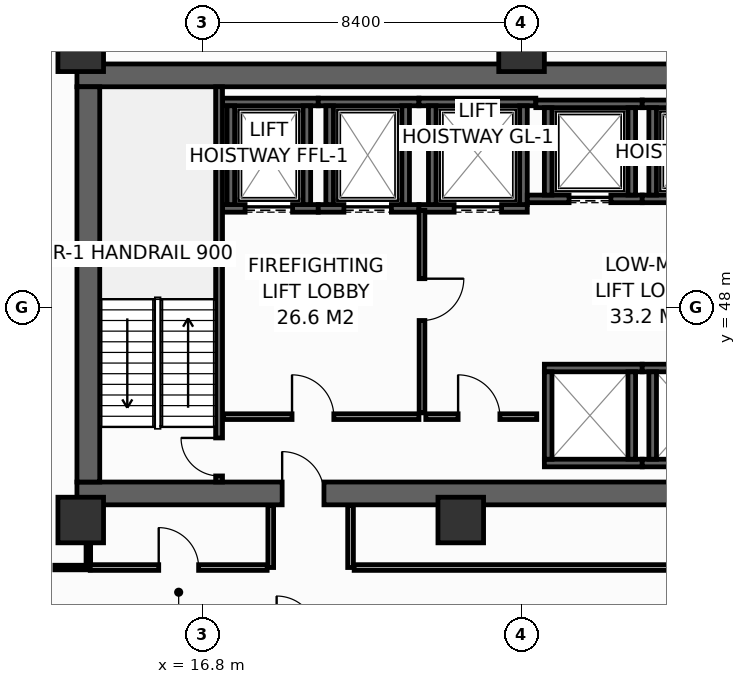
"""IFC4 building model, lengths in metres.
Left out: names, types, materials, properties, quantities, classifications, styles, units other than length and angle.
Written with IfcOpenShell. Run it as: python <this file> out.ifc"""

import sys

from ifc_helpers import new_model, si_unit, direction, frame, frame_2d, origin, origin_2d, place, context, subcontext, project, spatial, rectangle, hollow_rectangle, extrude, element, fill, save


model = new_model("IFC4")
c1 = context("Model", 3, precision=1e-05, world=origin(), true_north=direction((0.0, 1.0)))
c2 = subcontext(c1, "Body", "Model", "MODEL_VIEW")
j1 = project(units=[si_unit("LENGTHUNIT", "METRE"), si_unit("PLANEANGLEUNIT", "RADIAN")], contexts=[c1])
p1 = place(None, origin())
s1 = spatial("IfcSite", under=j1, at=p1, CompositionType="ELEMENT")
p2 = place(p1, origin())
s2 = spatial("IfcBuilding", under=s1, at=p2, CompositionType="ELEMENT")
p3 = place(p2, frame((0.0, 0.0, 56.0)))
s3 = spatial("IfcBuildingStorey", under=s2, at=p3, CompositionType="ELEMENT", Elevation=56.0)
p4 = place(p3, frame((13.5, 43.1, 0.0), z_axis=(0.0, 0.0, 1.0), x_axis=(1.0, 0.0, 0.0)))
e1 = element("IfcWall", 1, at=p4, inside=s3, PredefinedType="SHEAR", context=c2, shape_type="SweptSolid", body=[
    extrude(rectangle(XDim=32.9, YDim=0.6, at=frame_2d((16.45, 0.0))), origin(), (0.0, 0.0, 1.0), 4.15),
])
p5 = place(p4, frame((5.4, 0.0, 0.0)))
e2 = element("IfcOpeningElement", 2, at=p5, cuts=e1, PredefinedType="OPENING", context=c2, shape_type="SweptSolid", body=[
    extrude(rectangle(XDim=1.1, YDim=2.15, at=frame_2d((0.55, 1.075))), frame((0.0, 0.31, 0.0), z_axis=(0.0, -1.0, 0.0), x_axis=(1.0, 0.0, 0.0)), (0.0, 0.0, 1.0), 0.62),
])
p6 = place(p4, frame((25.6, 0.0, 0.0)))
e3 = element("IfcOpeningElement", 3, at=p6, cuts=e1, PredefinedType="OPENING", context=c2, shape_type="SweptSolid", body=[
    extrude(rectangle(XDim=1.1, YDim=2.15, at=frame_2d((0.55, 1.075))), frame((0.0, 0.31, 0.0), z_axis=(0.0, -1.0, 0.0), x_axis=(1.0, 0.0, 0.0)), (0.0, 0.0, 1.0), 0.62),
])
p7 = place(p3, frame((13.5, 54.1, 0.0), z_axis=(0.0, 0.0, 1.0), x_axis=(1.0, 0.0, 0.0)))
e4 = element("IfcWall", 4, at=p7, inside=s3, PredefinedType="SHEAR", context=c2, shape_type="SweptSolid", body=[
    extrude(rectangle(XDim=32.9, YDim=0.6, at=frame_2d((16.45, 0.0))), origin(), (0.0, 0.0, 1.0), 4.15),
])
p8 = place(p3, frame((13.8, 43.4, 0.0), z_axis=(0.0, 0.0, 1.0), x_axis=(0.0, 1.0, 0.0)))
e5 = element("IfcWall", 5, at=p8, inside=s3, PredefinedType="SHEAR", context=c2, shape_type="SweptSolid", body=[
    extrude(rectangle(XDim=10.4, YDim=0.6, at=frame_2d((5.2, 0.0))), origin(), (0.0, 0.0, 1.0), 4.15),
])
for number, where, z_axis, x_axis in (
    (6, (13.6, 54.8, 0.0), (0.0, 0.0, 1.0), (1.0, 0.0, 0.0)),
    (7, (25.2, 54.8, 0.0), (0.0, 0.0, 1.0), (1.0, 0.0, 0.0)),
    (8, (13.6, 42.4, 0.0), (0.0, 0.0, 1.0), (1.0, 0.0, 0.0)),
    (9, (23.6, 42.4, 0.0), (0.0, 0.0, 1.0), (1.0, 0.0, 0.0)),
):
    element("IfcColumn", number, at=place(p3, frame(where, z_axis=z_axis, x_axis=x_axis)), inside=s3, PredefinedType="COLUMN", context=c2, shape_type="SweptSolid", body=[
        extrude(hollow_rectangle(XDim=1.2, YDim=1.2, WallThickness=0.055, at=origin_2d()), origin(), (0.0, 0.0, 1.0), 4.4),
    ])
p9 = place(p3, frame((17.33, 50.6, 0.0), z_axis=(0.0, 0.0, 1.0), x_axis=(1.0, 0.0, 0.0)))
e10 = element("IfcWall", 10, at=p9, inside=s3, PredefinedType="SHEAR", context=c2, shape_type="SweptSolid", body=[
    extrude(rectangle(XDim=2.52, YDim=0.2, at=frame_2d((1.26, 0.0))), origin(), (0.0, 0.0, 1.0), 4.15),
])
p10 = place(p9, frame((0.595, 0.0, 0.0)))
e11 = element("IfcOpeningElement", 11, at=p10, cuts=e10, PredefinedType="OPENING", context=c2, shape_type="SweptSolid", body=[
    extrude(rectangle(XDim=1.25, YDim=2.3, at=frame_2d((0.625, 1.15))), frame((0.0, 0.11, 0.0), z_axis=(0.0, -1.0, 0.0), x_axis=(1.0, 0.0, 0.0)), (0.0, 0.0, 1.0), 0.22),
])
p11 = place(p3, frame((17.33, 53.4, 0.0), z_axis=(0.0, 0.0, 1.0), x_axis=(1.0, 0.0, 0.0)))
e12 = element("IfcWall", 12, at=p11, inside=s3, PredefinedType="SHEAR", context=c2, shape_type="SweptSolid", body=[
    extrude(rectangle(XDim=2.52, YDim=0.2, at=frame_2d((1.26, 0.0))), origin(), (0.0, 0.0, 1.0), 4.15),
])
for number, where, z_axis, x_axis in (
    (13, (17.55, 50.7, 0.0), (0.0, 0.0, 1.0), (0.0, 1.0, 0.0)),
    (14, (19.55, 50.7, 0.0), (0.0, 0.0, 1.0), (0.0, 1.0, 0.0)),
):
    element("IfcWall", number, at=place(p3, frame(where, z_axis=z_axis, x_axis=x_axis)), inside=s3, PredefinedType="SHEAR", context=c2, shape_type="SweptSolid", body=[
        extrude(rectangle(XDim=2.6, YDim=0.2, at=frame_2d((1.3, 0.0))), origin(), (0.0, 0.0, 1.0), 4.15),
    ])
p12 = place(p3, frame((19.85, 50.6, 0.0), z_axis=(0.0, 0.0, 1.0), x_axis=(1.0, 0.0, 0.0)))
e15 = element("IfcWall", 15, at=p12, inside=s3, PredefinedType="SHEAR", context=c2, shape_type="SweptSolid", body=[
    extrude(rectangle(XDim=2.65, YDim=0.2, at=frame_2d((1.325, 0.0))), origin(), (0.0, 0.0, 1.0), 4.15),
])
p13 = place(p12, frame((0.675, 0.0, 0.0)))
e16 = element("IfcOpeningElement", 16, at=p13, cuts=e15, PredefinedType="OPENING", context=c2, shape_type="SweptSolid", body=[
    extrude(rectangle(XDim=1.25, YDim=2.3, at=frame_2d((0.625, 1.15))), frame((0.0, 0.11, 0.0), z_axis=(0.0, -1.0, 0.0), x_axis=(1.0, 0.0, 0.0)), (0.0, 0.0, 1.0), 0.22),
])
p14 = place(p3, frame((19.85, 53.4, 0.0), z_axis=(0.0, 0.0, 1.0), x_axis=(1.0, 0.0, 0.0)))
e17 = element("IfcWall", 17, at=p14, inside=s3, PredefinedType="SHEAR", context=c2, shape_type="SweptSolid", body=[
    extrude(rectangle(XDim=2.65, YDim=0.2, at=frame_2d((1.325, 0.0))), origin(), (0.0, 0.0, 1.0), 4.15),
])
for number, where, z_axis, x_axis in (
    (18, (20.15, 50.7, 0.0), (0.0, 0.0, 1.0), (0.0, 1.0, 0.0)),
    (19, (22.15, 50.7, 0.0), (0.0, 0.0, 1.0), (0.0, 1.0, 0.0)),
):
    element("IfcWall", number, at=place(p3, frame(where, z_axis=z_axis, x_axis=x_axis)), inside=s3, PredefinedType="SHEAR", context=c2, shape_type="SweptSolid", body=[
        extrude(rectangle(XDim=2.6, YDim=0.2, at=frame_2d((1.3, 0.0))), origin(), (0.0, 0.0, 1.0), 4.15),
    ])
p15 = place(p3, frame((22.5, 50.6, 0.0), z_axis=(0.0, 0.0, 1.0), x_axis=(1.0, 0.0, 0.0)))
e20 = element("IfcWall", 20, at=p15, inside=s3, PredefinedType="SHEAR", context=c2, shape_type="SweptSolid", body=[
    extrude(rectangle(XDim=2.85, YDim=0.2, at=frame_2d((1.425, 0.0))), origin(), (0.0, 0.0, 1.0), 4.15),
])
p16 = place(p15, frame((0.925, 0.0, 0.0)))
e21 = element("IfcOpeningElement", 21, at=p16, cuts=e20, PredefinedType="OPENING", context=c2, shape_type="SweptSolid", body=[
    extrude(rectangle(XDim=1.25, YDim=2.3, at=frame_2d((0.625, 1.15))), frame((0.0, 0.11, 0.0), z_axis=(0.0, -1.0, 0.0), x_axis=(1.0, 0.0, 0.0)), (0.0, 0.0, 1.0), 0.22),
])
p17 = place(p3, frame((22.5, 53.4, 0.0), z_axis=(0.0, 0.0, 1.0), x_axis=(1.0, 0.0, 0.0)))
e22 = element("IfcWall", 22, at=p17, inside=s3, PredefinedType="SHEAR", context=c2, shape_type="SweptSolid", body=[
    extrude(rectangle(XDim=3.075, YDim=0.2, at=frame_2d((1.538, 0.0))), origin(), (0.0, 0.0, 1.0), 4.15),
])
for number, where, z_axis, x_axis in (
    (23, (22.85, 50.7, 0.0), (0.0, 0.0, 1.0), (0.0, 1.0, 0.0)),
    (24, (25.25, 50.7, 0.0), (0.0, 0.0, 1.0), (0.0, 1.0, 0.0)),
):
    element("IfcWall", number, at=place(p3, frame(where, z_axis=z_axis, x_axis=x_axis)), inside=s3, PredefinedType="SHEAR", context=c2, shape_type="SweptSolid", body=[
        extrude(rectangle(XDim=2.6, YDim=0.2, at=frame_2d((1.3, 0.0))), origin(), (0.0, 0.0, 1.0), 4.15),
    ])
p18 = place(p3, frame((25.35, 50.85, 0.0), z_axis=(0.0, 0.0, 1.0), x_axis=(1.0, 0.0, 0.0)))
e25 = element("IfcWall", 25, at=p18, inside=s3, PredefinedType="SHEAR", context=c2, shape_type="SweptSolid", body=[
    extrude(rectangle(XDim=3.025, YDim=0.2, at=frame_2d((1.512, 0.0))), origin(), (0.0, 0.0, 1.0), 4.15),
])
p19 = place(p18, frame((1.1, 0.0, 0.0)))
e26 = element("IfcOpeningElement", 26, at=p19, cuts=e25, PredefinedType="OPENING", context=c2, shape_type="SweptSolid", body=[
    extrude(rectangle(XDim=1.1, YDim=2.2, at=frame_2d((0.55, 1.1))), frame((0.0, 0.11, 0.0), z_axis=(0.0, -1.0, 0.0), x_axis=(1.0, 0.0, 0.0)), (0.0, 0.0, 1.0), 0.22),
])
p20 = place(p3, frame((25.575, 53.35, 0.0), z_axis=(0.0, 0.0, 1.0), x_axis=(1.0, 0.0, 0.0)))
e27 = element("IfcWall", 27, at=p20, inside=s3, PredefinedType="SHEAR", context=c2, shape_type="SweptSolid", body=[
    extrude(rectangle(XDim=2.8, YDim=0.2, at=frame_2d((1.4, 0.0))), origin(), (0.0, 0.0, 1.0), 4.15),
])
for number, where, z_axis, x_axis in (
    (28, (25.9, 50.95, 0.0), (0.0, 0.0, 1.0), (0.0, 1.0, 0.0)),
    (29, (28.1, 50.95, 0.0), (0.0, 0.0, 1.0), (0.0, 1.0, 0.0)),
):
    element("IfcWall", number, at=place(p3, frame(where, z_axis=z_axis, x_axis=x_axis)), inside=s3, PredefinedType="SHEAR", context=c2, shape_type="SweptSolid", body=[
        extrude(rectangle(XDim=2.3, YDim=0.2, at=frame_2d((1.15, 0.0))), origin(), (0.0, 0.0, 1.0), 4.15),
    ])
p21 = place(p3, frame((28.375, 50.85, 0.0), z_axis=(0.0, 0.0, 1.0), x_axis=(1.0, 0.0, 0.0)))
e30 = element("IfcWall", 30, at=p21, inside=s3, PredefinedType="SHEAR", context=c2, shape_type="SweptSolid", body=[
    extrude(rectangle(XDim=2.75, YDim=0.2, at=frame_2d((1.375, 0.0))), origin(), (0.0, 0.0, 1.0), 4.15),
])
p22 = place(p21, frame((0.825, 0.0, 0.0)))
e31 = element("IfcOpeningElement", 31, at=p22, cuts=e30, PredefinedType="OPENING", context=c2, shape_type="SweptSolid", body=[
    extrude(rectangle(XDim=1.1, YDim=2.2, at=frame_2d((0.55, 1.1))), frame((0.0, 0.11, 0.0), z_axis=(0.0, -1.0, 0.0), x_axis=(1.0, 0.0, 0.0)), (0.0, 0.0, 1.0), 0.22),
])
p23 = place(p3, frame((28.375, 53.35, 0.0), z_axis=(0.0, 0.0, 1.0), x_axis=(1.0, 0.0, 0.0)))
e32 = element("IfcWall", 32, at=p23, inside=s3, PredefinedType="SHEAR", context=c2, shape_type="SweptSolid", body=[
    extrude(rectangle(XDim=2.75, YDim=0.2, at=frame_2d((1.375, 0.0))), origin(), (0.0, 0.0, 1.0), 4.15),
])
p24 = place(p3, frame((28.65, 50.95, 0.0), z_axis=(0.0, 0.0, 1.0), x_axis=(0.0, 1.0, 0.0)))
e33 = element("IfcWall", 33, at=p24, inside=s3, PredefinedType="SHEAR", context=c2, shape_type="SweptSolid", body=[
    extrude(rectangle(XDim=2.3, YDim=0.2, at=frame_2d((1.15, 0.0))), origin(), (0.0, 0.0, 1.0), 4.15),
])
for number, where, z_axis, x_axis in (
    (34, (25.8, 43.9, 0.0), (0.0, 0.0, 1.0), (1.0, 0.0, 0.0)),
    (35, (25.8, 46.4, 0.0), (0.0, 0.0, 1.0), (1.0, 0.0, 0.0)),
):
    element("IfcWall", number, at=place(p3, frame(where, z_axis=z_axis, x_axis=x_axis)), inside=s3, PredefinedType="SHEAR", context=c2, shape_type="SweptSolid", body=[
        extrude(rectangle(XDim=2.575, YDim=0.2, at=frame_2d((1.288, 0.0))), origin(), (0.0, 0.0, 1.0), 4.15),
    ])
for number, where, z_axis, x_axis in (
    (36, (25.9, 44.0, 0.0), (0.0, 0.0, 1.0), (0.0, 1.0, 0.0)),
    (37, (28.1, 44.0, 0.0), (0.0, 0.0, 1.0), (0.0, 1.0, 0.0)),
):
    element("IfcWall", number, at=place(p3, frame(where, z_axis=z_axis, x_axis=x_axis)), inside=s3, PredefinedType="SHEAR", context=c2, shape_type="SweptSolid", body=[
        extrude(rectangle(XDim=2.3, YDim=0.2, at=frame_2d((1.15, 0.0))), origin(), (0.0, 0.0, 1.0), 4.15),
    ])
for number, where, z_axis, x_axis in (
    (38, (28.375, 43.9, 0.0), (0.0, 0.0, 1.0), (1.0, 0.0, 0.0)),
    (39, (28.375, 46.4, 0.0), (0.0, 0.0, 1.0), (1.0, 0.0, 0.0)),
):
    element("IfcWall", number, at=place(p3, frame(where, z_axis=z_axis, x_axis=x_axis)), inside=s3, PredefinedType="SHEAR", context=c2, shape_type="SweptSolid", body=[
        extrude(rectangle(XDim=2.75, YDim=0.2, at=frame_2d((1.375, 0.0))), origin(), (0.0, 0.0, 1.0), 4.15),
    ])
p25 = place(p3, frame((28.65, 44.0, 0.0), z_axis=(0.0, 0.0, 1.0), x_axis=(0.0, 1.0, 0.0)))
e40 = element("IfcWall", 40, at=p25, inside=s3, PredefinedType="SHEAR", context=c2, shape_type="SweptSolid", body=[
    extrude(rectangle(XDim=2.3, YDim=0.2, at=frame_2d((1.15, 0.0))), origin(), (0.0, 0.0, 1.0), 4.15),
])
p26 = place(p3, frame((17.24, 43.4, 0.0), z_axis=(0.0, 0.0, 1.0), x_axis=(0.0, 1.0, 0.0)))
e41 = element("IfcWall", 41, at=p26, inside=s3, PredefinedType="SHEAR", context=c2, shape_type="SweptSolid", body=[
    extrude(rectangle(XDim=10.4, YDim=0.18, at=frame_2d((5.2, 0.0))), origin(), (0.0, 0.0, 1.0), 4.15),
])
p27 = place(p26, frame((0.16, 0.0, 0.0)))
e42 = element("IfcOpeningElement", 42, at=p27, cuts=e41, PredefinedType="OPENING", context=c2, shape_type="SweptSolid", body=[
    extrude(rectangle(XDim=1.0, YDim=2.15, at=frame_2d((0.5, 1.075))), frame((0.0, 0.1, 0.0), z_axis=(0.0, -1.0, 0.0), x_axis=(1.0, 0.0, 0.0)), (0.0, 0.0, 1.0), 0.2),
])
p28 = place(p3, frame((17.36, 45.12, 0.0), z_axis=(0.0, 0.0, 1.0), x_axis=(1.0, 0.0, 0.0)))
e43 = element("IfcWall", 43, at=p28, inside=s3, PredefinedType="PARTITIONING", context=c2, shape_type="SweptSolid", body=[
    extrude(rectangle(XDim=5.14, YDim=0.15, at=frame_2d((2.57, 0.0))), origin(), (0.0, 0.0, 1.0), 4.15),
])
p29 = place(p28, frame((1.8, 0.0, 0.0)))
e44 = element("IfcOpeningElement", 44, at=p29, cuts=e43, PredefinedType="OPENING", context=c2, shape_type="SweptSolid", body=[
    extrude(rectangle(XDim=1.1, YDim=2.15, at=frame_2d((0.55, 1.075))), frame((0.0, 0.085, 0.0), z_axis=(0.0, -1.0, 0.0), x_axis=(1.0, 0.0, 0.0)), (0.0, 0.0, 1.0), 0.17),
])
p30 = place(p3, frame((22.58, 50.55, 0.0), z_axis=(0.0, 0.0, 1.0), x_axis=(0.0, -1.0, 0.0)))
e45 = element("IfcWall", 45, at=p30, inside=s3, PredefinedType="PARTITIONING", context=c2, shape_type="SweptSolid", body=[
    extrude(rectangle(XDim=5.33, YDim=0.15, at=frame_2d((2.665, 0.0))), origin(), (0.0, 0.0, 1.0), 4.15),
])
p31 = place(p30, frame((1.8, 0.0, 0.0)))
e46 = element("IfcOpeningElement", 46, at=p31, cuts=e45, PredefinedType="OPENING", context=c2, shape_type="SweptSolid", body=[
    extrude(rectangle(XDim=1.1, YDim=2.15, at=frame_2d((0.55, 1.075))), frame((0.0, 0.085, 0.0), z_axis=(0.0, -1.0, 0.0), x_axis=(1.0, 0.0, 0.0)), (0.0, 0.0, 1.0), 0.17),
])
p32 = place(p3, frame((22.68, 45.12, 0.0), z_axis=(0.0, 0.0, 1.0), x_axis=(1.0, 0.0, 0.0)))
e47 = element("IfcWall", 47, at=p32, inside=s3, PredefinedType="PARTITIONING", context=c2, shape_type="SweptSolid", body=[
    extrude(rectangle(XDim=2.92, YDim=0.15, at=frame_2d((1.46, 0.0))), origin(), (0.0, 0.0, 1.0), 4.15),
])
p33 = place(p32, frame((0.85, 0.0, 0.0)))
e48 = element("IfcOpeningElement", 48, at=p33, cuts=e47, PredefinedType="OPENING", context=c2, shape_type="SweptSolid", body=[
    extrude(rectangle(XDim=1.1, YDim=2.15, at=frame_2d((0.55, 1.075))), frame((0.0, 0.085, 0.0), z_axis=(0.0, -1.0, 0.0), x_axis=(1.0, 0.0, 0.0)), (0.0, 0.0, 1.0), 0.17),
])
p34 = place(p3, frame((12.92, 41.15, 0.0), z_axis=(0.0, 0.0, 1.0), x_axis=(1.0, 0.0, 0.0)))
e49 = element("IfcWall", 49, at=p34, inside=s3, PredefinedType="PARTITIONING", context=c2, shape_type="SweptSolid", body=[
    extrude(rectangle(XDim=0.93, YDim=0.12, at=frame_2d((0.465, 0.0))), origin(), (0.0, 0.0, 1.0), 4.15),
])
p35 = place(p3, frame((13.8, 41.23, 0.0), z_axis=(0.0, 0.0, 1.0), x_axis=(0.0, 1.0, 0.0)))
e50 = element("IfcWall", 50, at=p35, inside=s3, PredefinedType="PARTITIONING", context=c2, shape_type="SweptSolid", body=[
    extrude(rectangle(XDim=1.55, YDim=0.12, at=frame_2d((0.775, 0.0))), origin(), (0.0, 0.0, 1.0), 4.15),
])
for number, where, z_axis, x_axis in (
    (51, (18.6, 41.15, 0.0), (0.0, 0.0, 1.0), (0.0, 1.0, 0.0)),
    (52, (20.7, 41.15, 0.0), (0.0, 0.0, 1.0), (0.0, 1.0, 0.0)),
):
    element("IfcWall", number, at=place(p3, frame(where, z_axis=z_axis, x_axis=x_axis)), inside=s3, PredefinedType="PARTITIONING", context=c2, shape_type="SweptSolid", body=[
        extrude(rectangle(XDim=1.63, YDim=0.15, at=frame_2d((0.815, 0.0))), origin(), (0.0, 0.0, 1.0), 4.15),
    ])
p36 = place(p3, frame((13.85, 41.15, 0.0), z_axis=(0.0, 0.0, 1.0), x_axis=(1.0, 0.0, 0.0)))
e53 = element("IfcWall", 53, at=p36, inside=s3, PredefinedType="PARTITIONING", context=c2, shape_type="SweptSolid", body=[
    extrude(rectangle(XDim=4.655, YDim=0.15, at=frame_2d((2.327, 0.0))), origin(), (0.0, 0.0, 1.0), 4.15),
])
p37 = place(p36, frame((1.802, 0.0, 0.0)))
e54 = element("IfcOpeningElement", 54, at=p37, cuts=e53, PredefinedType="OPENING", context=c2, shape_type="SweptSolid", body=[
    extrude(rectangle(XDim=1.05, YDim=2.15, at=frame_2d((0.525, 1.075))), frame((0.0, 0.085, 0.0), z_axis=(0.0, -1.0, 0.0), x_axis=(1.0, 0.0, 0.0)), (0.0, 0.0, 1.0), 0.17),
])
p38 = place(p3, frame((20.795, 41.15, 0.0), z_axis=(0.0, 0.0, 1.0), x_axis=(1.0, 0.0, 0.0)))
e55 = element("IfcWall", 55, at=p38, inside=s3, PredefinedType="PARTITIONING", context=c2, shape_type="SweptSolid", body=[
    extrude(rectangle(XDim=17.91, YDim=0.15, at=frame_2d((8.955, 0.0))), origin(), (0.0, 0.0, 1.0), 3.335),
])
p39 = place(p38, frame((8.43, 0.0, 0.0)))
e56 = element("IfcOpeningElement", 56, at=p39, cuts=e55, PredefinedType="OPENING", context=c2, shape_type="SweptSolid", body=[
    extrude(rectangle(XDim=1.05, YDim=2.15, at=frame_2d((0.525, 1.075))), frame((0.0, 0.085, 0.0), z_axis=(0.0, -1.0, 0.0), x_axis=(1.0, 0.0, 0.0)), (0.0, 0.0, 1.0), 0.17),
])
p40 = place(p10, origin())
e57 = element("IfcDoor", 57, at=p40, inside=s3, OperationType="SLIDING_TO_LEFT", PredefinedType="DOOR", context=c2, shape_type="SweptSolid", body=[
    extrude(rectangle(XDim=1.25, YDim=2.3, at=frame_2d((0.625, 1.15))), frame((0.0, 0.025, 0.0), z_axis=(0.0, -1.0, 0.0), x_axis=(1.0, 0.0, 0.0)), (0.0, 0.0, 1.0), 0.05),
])
fill(e11, e57)
p41 = place(p13, origin())
e58 = element("IfcDoor", 58, at=p41, inside=s3, OperationType="SLIDING_TO_LEFT", PredefinedType="DOOR", context=c2, shape_type="SweptSolid", body=[
    extrude(rectangle(XDim=1.25, YDim=2.3, at=frame_2d((0.625, 1.15))), frame((0.0, 0.025, 0.0), z_axis=(0.0, -1.0, 0.0), x_axis=(1.0, 0.0, 0.0)), (0.0, 0.0, 1.0), 0.05),
])
fill(e16, e58)
p42 = place(p16, origin())
e59 = element("IfcDoor", 59, at=p42, inside=s3, OperationType="SLIDING_TO_LEFT", PredefinedType="DOOR", context=c2, shape_type="SweptSolid", body=[
    extrude(rectangle(XDim=1.25, YDim=2.3, at=frame_2d((0.625, 1.15))), frame((0.0, 0.025, 0.0), z_axis=(0.0, -1.0, 0.0), x_axis=(1.0, 0.0, 0.0)), (0.0, 0.0, 1.0), 0.05),
])
fill(e21, e59)
p43 = place(p19, origin())
e60 = element("IfcDoor", 60, at=p43, inside=s3, OperationType="SLIDING_TO_LEFT", PredefinedType="DOOR", context=c2, shape_type="SweptSolid", body=[
    extrude(rectangle(XDim=1.1, YDim=2.2, at=frame_2d((0.55, 1.1))), frame((0.0, 0.025, 0.0), z_axis=(0.0, -1.0, 0.0), x_axis=(1.0, 0.0, 0.0)), (0.0, 0.0, 1.0), 0.05),
])
fill(e26, e60)
p44 = place(p27, origin())
e61 = element("IfcDoor", 61, at=p44, inside=s3, OperationType="SINGLE_SWING_RIGHT", PredefinedType="DOOR", context=c2, shape_type="SweptSolid", body=[
    extrude(rectangle(XDim=1.0, YDim=2.15, at=frame_2d((0.5, 1.075))), frame((0.0, 0.025, 0.0), z_axis=(0.0, -1.0, 0.0), x_axis=(1.0, 0.0, 0.0)), (0.0, 0.0, 1.0), 0.05),
])
fill(e42, e61)
p45 = place(p29, origin())
e62 = element("IfcDoor", 62, at=p45, inside=s3, OperationType="SINGLE_SWING_LEFT", PredefinedType="DOOR", context=c2, shape_type="SweptSolid", body=[
    extrude(rectangle(XDim=1.1, YDim=2.15, at=frame_2d((0.55, 1.075))), frame((0.0, 0.025, 0.0), z_axis=(0.0, -1.0, 0.0), x_axis=(1.0, 0.0, 0.0)), (0.0, 0.0, 1.0), 0.05),
])
fill(e44, e62)
p46 = place(p31, origin())
e63 = element("IfcDoor", 63, at=p46, inside=s3, OperationType="SINGLE_SWING_LEFT", PredefinedType="DOOR", context=c2, shape_type="SweptSolid", body=[
    extrude(rectangle(XDim=1.1, YDim=2.15, at=frame_2d((0.55, 1.075))), frame((0.0, 0.025, 0.0), z_axis=(0.0, -1.0, 0.0), x_axis=(1.0, 0.0, 0.0)), (0.0, 0.0, 1.0), 0.05),
])
fill(e46, e63)
p47 = place(p33, origin())
e64 = element("IfcDoor", 64, at=p47, inside=s3, OperationType="SINGLE_SWING_LEFT", PredefinedType="DOOR", context=c2, shape_type="SweptSolid", body=[
    extrude(rectangle(XDim=1.1, YDim=2.15, at=frame_2d((0.55, 1.075))), frame((0.0, 0.025, 0.0), z_axis=(0.0, -1.0, 0.0), x_axis=(1.0, 0.0, 0.0)), (0.0, 0.0, 1.0), 0.05),
])
fill(e48, e64)
p48 = place(p5, origin())
e65 = element("IfcDoor", 65, at=p48, inside=s3, OperationType="SINGLE_SWING_LEFT", PredefinedType="DOOR", context=c2, shape_type="SweptSolid", body=[
    extrude(rectangle(XDim=1.1, YDim=2.15, at=frame_2d((0.55, 1.075))), frame((0.0, 0.025, 0.0), z_axis=(0.0, -1.0, 0.0), x_axis=(1.0, 0.0, 0.0)), (0.0, 0.0, 1.0), 0.05),
])
fill(e2, e65)
p49 = place(p37, origin())
e66 = element("IfcDoor", 66, at=p49, inside=s3, OperationType="SINGLE_SWING_LEFT", PredefinedType="DOOR", context=c2, shape_type="SweptSolid", body=[
    extrude(rectangle(XDim=1.05, YDim=2.15, at=frame_2d((0.525, 1.075))), frame((0.0, 0.025, 0.0), z_axis=(0.0, -1.0, 0.0), x_axis=(1.0, 0.0, 0.0)), (0.0, 0.0, 1.0), 0.05),
])
fill(e54, e66)
save(model, sys.argv[1])
